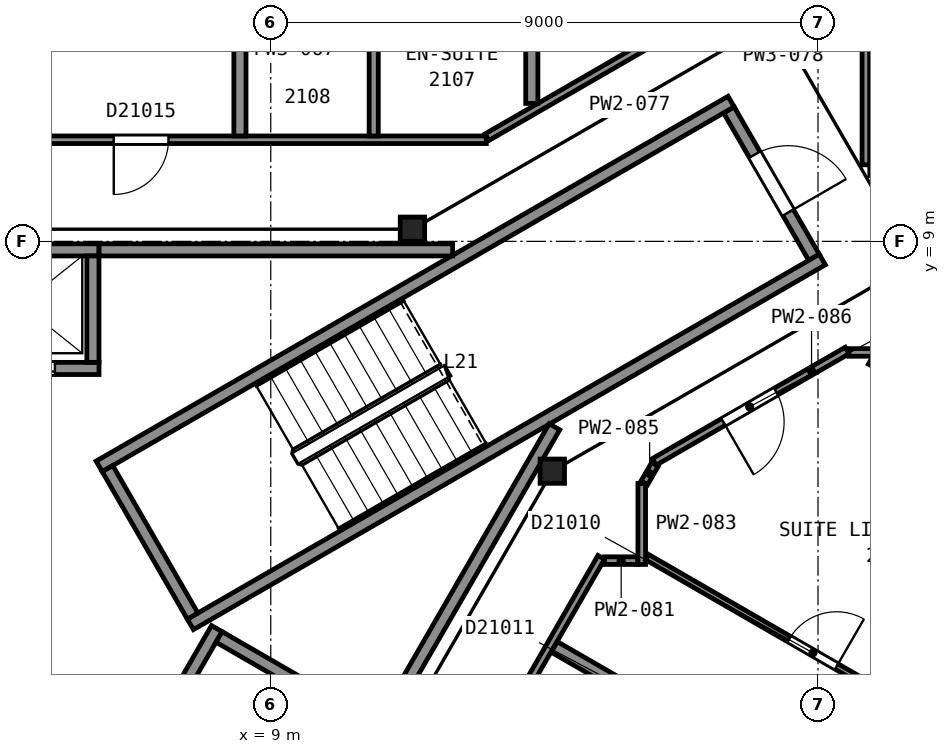
"""IFC4 building model, lengths in metres.
Left out: names, types, materials, properties, quantities, classifications, styles, units other than length and angle.
Written with IfcOpenShell. Run it as: python <this file> out.ifc"""

import sys

from ifc_helpers import new_model, si_unit, direction, frame, frame_2d, origin, origin_2d, place, context, subcontext, project, spatial, rectangle, i_section, extrude, element, fill, save


model = new_model("IFC4")
c1 = context("Model", 3, precision=1e-05, world=origin(), true_north=direction((0.0, 1.0)))
c2 = subcontext(c1, "Body", "Model", "MODEL_VIEW")
j1 = project(units=[si_unit("LENGTHUNIT", "METRE"), si_unit("PLANEANGLEUNIT", "RADIAN")], contexts=[c1])
p1 = place(None, origin())
s1 = spatial("IfcSite", under=j1, at=p1, CompositionType="ELEMENT")
p2 = place(p1, origin())
s2 = spatial("IfcBuilding", under=s1, at=p2, CompositionType="ELEMENT")
p3 = place(p2, frame((0.0, 0.0, 92.8)))
s3 = spatial("IfcBuildingStorey", under=s2, at=p3, CompositionType="ELEMENT", Elevation=92.8)
for number, where, z_axis, x_axis in (
    (1, (13.63, 5.22, 0.0), (0.0, 0.0, 1.0), (1.0, 0.0, 0.0)),
    (2, (11.33, 9.2, 0.0), (0.0, 0.0, 1.0), (1.0, 0.0, 0.0)),
):
    element("IfcColumn", number, at=place(p3, frame(where, z_axis=z_axis, x_axis=x_axis)), inside=s3, PredefinedType="COLUMN", context=c2, shape_type="SweptSolid", body=[
        extrude(i_section(OverallWidth=0.401, OverallDepth=0.399, WebThickness=0.025, FlangeThickness=0.04, FilletRadius=0.015, at=origin_2d()), origin(), (0.0, 0.0, 1.0), 3.6),
    ])
p4 = place(p3, frame((17.934, 8.738, 0.0), z_axis=(0.0, 0.0, 1.0), x_axis=(-0.49998411664, 0.866034573852, 0.0)))
e3 = element("IfcWall", 3, at=p4, inside=s3, PredefinedType="PARTITIONING", context=c2, shape_type="SweptSolid", body=[
    extrude(rectangle(XDim=2.8, YDim=0.2, at=frame_2d((1.4, 0.0))), origin(), (0.0, 0.0, 1.0), 3.35),
])
p5 = place(p4, frame((0.85, 0.0, 0.0)))
e4 = element("IfcOpeningElement", 4, at=p5, cuts=e3, PredefinedType="OPENING", context=c2, shape_type="SweptSolid", body=[
    extrude(rectangle(XDim=1.1, YDim=2.1, at=frame_2d((0.55, 1.05))), frame((0.0, 0.11, 0.0), z_axis=(0.0, -1.0, 0.0), x_axis=(1.0, 0.0, 0.0)), (0.0, 0.0, 1.0), 0.22),
])
for number, where, z_axis, x_axis in (
    (5, (6.178, 5.299, 0.0), (0.0, 0.0, 1.0), (0.866, 0.5, 0.0)),
    (6, (7.678, 2.701, 0.0), (0.0, 0.0, 1.0), (0.866, 0.5, 0.0)),
):
    element("IfcWall", number, at=place(p3, frame(where, z_axis=z_axis, x_axis=x_axis)), inside=s3, PredefinedType="PARTITIONING", context=c2, shape_type="SweptSolid", body=[
        extrude(rectangle(XDim=12.0, YDim=0.2, at=frame_2d((6.0, 0.0))), origin(), (0.0, 0.0, 1.0), 3.35),
    ])
p6 = place(p3, frame((7.715, 2.838, 0.0), z_axis=(0.0, 0.0, 1.0), x_axis=(-0.500049511043, 0.865996816683, 0.0)))
e7 = element("IfcWall", 7, at=p6, inside=s3, PredefinedType="PARTITIONING", context=c2, shape_type="SweptSolid", body=[
    extrude(rectangle(XDim=2.8, YDim=0.2, at=frame_2d((1.4, 0.0))), origin(), (0.0, 0.0, 1.0), 3.35),
])
p7 = place(p3, frame((3.625, 6.91, 0.0), z_axis=(0.0, 0.0, 1.0), x_axis=(1.0, 0.0, 0.0)))
e8 = element("IfcWall", 8, at=p7, inside=s3, PredefinedType="PARTITIONING", context=c2, shape_type="SweptSolid", body=[
    extrude(rectangle(XDim=2.55, YDim=0.2, at=frame_2d((1.275, 0.0))), origin(), (0.0, 0.0, 1.0), 3.6),
])
p8 = place(p7, frame((0.725, 0.0, 0.0)))
e9 = element("IfcOpeningElement", 9, at=p8, cuts=e8, PredefinedType="OPENING", context=c2, shape_type="SweptSolid", body=[
    extrude(rectangle(XDim=1.1, YDim=2.1, at=frame_2d((0.55, 1.05))), frame((0.0, 0.11, 0.0), z_axis=(0.0, -1.0, 0.0), x_axis=(1.0, 0.0, 0.0)), (0.0, 0.0, 1.0), 0.22),
])
p9 = place(p3, frame((3.625, 8.86, 0.0), z_axis=(0.0, 0.0, 1.0), x_axis=(1.0, 0.0, 0.0)))
e10 = element("IfcWall", 10, at=p9, inside=s3, PredefinedType="PARTITIONING", context=c2, shape_type="SweptSolid", body=[
    extrude(rectangle(XDim=2.55, YDim=0.2, at=frame_2d((1.275, 0.0))), origin(), (0.0, 0.0, 1.0), 3.6),
])
p10 = place(p3, frame((5.663, -1.612, 0.0), z_axis=(0.0, 0.0, 1.0), x_axis=(0.49998122708, 0.866036242063, 0.0)))
e11 = element("IfcWall", 11, at=p10, inside=s3, PredefinedType="PARTITIONING", context=c2, shape_type="SweptSolid", body=[
    extrude(rectangle(XDim=4.9, YDim=0.2, at=frame_2d((2.45, 0.0))), origin(), (0.0, 0.0, 1.0), 3.6),
])
p11 = place(p3, frame((6.075, 7.01, 0.0), z_axis=(0.0, 0.0, 1.0), x_axis=(0.0, 1.0, 0.0)))
e12 = element("IfcWall", 12, at=p11, inside=s3, PredefinedType="PARTITIONING", context=c2, shape_type="SweptSolid", body=[
    extrude(rectangle(XDim=1.75, YDim=0.2, at=frame_2d((0.875, 0.0))), origin(), (0.0, 0.0, 1.0), 3.6),
])
p12 = place(p3, frame((9.665, 1.62, 0.0), z_axis=(0.0, 0.0, 1.0), x_axis=(-0.866002029911, 0.500040482552, 0.0)))
e13 = element("IfcWall", 13, at=p12, inside=s3, PredefinedType="PARTITIONING", context=c2, shape_type="SweptSolid", body=[
    extrude(rectangle(XDim=1.75, YDim=0.2, at=frame_2d((0.875, 0.0))), origin(), (0.0, 0.0, 1.0), 3.6),
])
p13 = place(p3, frame((6.177, 8.86, 0.0), z_axis=(0.0, 0.0, 1.0), x_axis=(1.0, 0.0, 0.0)))
e14 = element("IfcWall", 14, at=p13, inside=s3, PredefinedType="PARTITIONING", context=c2, shape_type="SweptSolid", body=[
    extrude(rectangle(XDim=5.814, YDim=0.2, at=frame_2d((2.907, 0.0))), origin(), (0.0, 0.0, 1.0), 3.35),
])
p14 = place(p3, frame((8.492, -3.012, 0.0), z_axis=(0.0, 0.0, 1.0), x_axis=(0.499972957231, 0.866041016371, 0.0)))
e15 = element("IfcWall", 15, at=p14, inside=s3, PredefinedType="PARTITIONING", context=c2, shape_type="SweptSolid", body=[
    extrude(rectangle(XDim=10.349, YDim=0.2, at=frame_2d((5.174, 0.0))), origin(), (0.0, 0.0, 1.0), 3.35),
])
p15 = place(p3, frame((-12.544, 10.671, 0.0), z_axis=(0.0, 0.0, 1.0), x_axis=(1.0, 0.0, 0.0)))
e16 = element("IfcWall", 16, at=p15, inside=s3, PredefinedType="PARTITIONING", context=c2, shape_type="SweptSolid", body=[
    extrude(rectangle(XDim=25.089, YDim=0.125, at=frame_2d((12.544, 0.0))), origin(), (0.0, 0.0, 1.0), 2.613),
])
p16 = place(p15, frame((18.962, 0.0, 0.0)))
e17 = element("IfcOpeningElement", 17, at=p16, cuts=e16, PredefinedType="OPENING", context=c2, shape_type="SweptSolid", body=[
    extrude(rectangle(XDim=0.9, YDim=2.1, at=frame_2d((0.45, 1.05))), frame((0.0, 0.073, 0.0), z_axis=(0.0, -1.0, 0.0), x_axis=(1.0, 0.0, 0.0)), (0.0, 0.0, 1.0), 0.145),
])
p17 = place(p15, frame((14.857, 0.0, 0.0)))
e18 = element("IfcOpeningElement", 18, at=p17, cuts=e16, PredefinedType="OPENING", context=c2, shape_type="SweptSolid", body=[
    extrude(rectangle(XDim=1.0, YDim=2.1, at=frame_2d((0.5, 1.05))), frame((0.0, 0.073, 0.0), z_axis=(0.0, -1.0, 0.0), x_axis=(1.0, 0.0, 0.0)), (0.0, 0.0, 1.0), 0.145),
])
p18 = place(p3, frame((8.493, 10.733, 0.0), z_axis=(0.0, 0.0, 1.0), x_axis=(0.0, 1.0, 0.0)))
e19 = element("IfcWall", 19, at=p18, inside=s3, PredefinedType="PARTITIONING", context=c2, shape_type="SweptSolid", body=[
    extrude(rectangle(XDim=2.838, YDim=0.2, at=frame_2d((1.419, 0.0))), origin(), (0.0, 0.0, 1.0), 2.613),
])
p19 = place(p3, frame((9.41, -4.902, 0.0), z_axis=(0.0, 0.0, 1.0), x_axis=(0.499971244726, 0.866042005013, 0.0)))
e20 = element("IfcWall", 20, at=p19, inside=s3, PredefinedType="PARTITIONING", context=c2, shape_type="SweptSolid", body=[
    extrude(rectangle(XDim=10.052, YDim=0.125, at=frame_2d((5.026, 0.0))), origin(), (0.0, 0.0, 1.0), 2.613),
])
p20 = place(p3, frame((10.693, 10.733, 0.0), z_axis=(0.0, 0.0, 1.0), x_axis=(0.0, 1.0, 0.0)))
e21 = element("IfcWall", 21, at=p20, inside=s3, PredefinedType="PARTITIONING", context=c2, shape_type="SweptSolid", body=[
    extrude(rectangle(XDim=6.982, YDim=0.15, at=frame_2d((3.491, 0.0))), origin(), (0.0, 0.0, 1.0), 2.613),
])
p21 = place(p3, frame((12.556, 10.713, 0.0), z_axis=(0.0, 0.0, 1.0), x_axis=(0.86603035395, 0.499991425964, 0.0)))
e22 = element("IfcWall", 22, at=p21, inside=s3, PredefinedType="PARTITIONING", context=c2, shape_type="SweptSolid", body=[
    extrude(rectangle(XDim=3.824, YDim=0.125, at=frame_2d((1.912, 0.0))), origin(), (0.0, 0.0, 1.0), 2.613),
])
p22 = place(p3, frame((13.293, 11.269, 0.0), z_axis=(0.0, 0.0, 1.0), x_axis=(0.0, 1.0, 0.0)))
e23 = element("IfcWall", 23, at=p22, inside=s3, PredefinedType="PARTITIONING", context=c2, shape_type="SweptSolid", body=[
    extrude(rectangle(XDim=3.665, YDim=0.2, at=frame_2d((1.833, 0.0))), origin(), (0.0, 0.0, 1.0), 2.613),
])
p23 = place(p22, frame((1.32, 0.0, 0.0)))
e24 = element("IfcOpeningElement", 24, at=p23, cuts=e23, PredefinedType="OPENING", context=c2, shape_type="SweptSolid", body=[
    extrude(rectangle(XDim=0.8, YDim=2.1, at=frame_2d((0.4, 1.05))), frame((0.0, 0.11, 0.0), z_axis=(0.0, -1.0, 0.0), x_axis=(1.0, 0.0, 0.0)), (0.0, 0.0, 1.0), 0.22),
])
p24 = place(p3, frame((16.463, 0.714, 0.0), z_axis=(0.0, 0.0, 1.0), x_axis=(-0.86609757561, 0.499874973892, 0.0)))
e25 = element("IfcWall", 25, at=p24, inside=s3, PredefinedType="PARTITIONING", context=c2, shape_type="SweptSolid", body=[
    extrude(rectangle(XDim=3.233, YDim=0.2, at=frame_2d((1.617, 0.0))), origin(), (0.0, 0.0, 1.0), 2.613),
])
p25 = place(p24, frame((1.301, 0.0, 0.0)))
e26 = element("IfcOpeningElement", 26, at=p25, cuts=e25, PredefinedType="OPENING", context=c2, shape_type="SweptSolid", body=[
    extrude(rectangle(XDim=0.8, YDim=2.1, at=frame_2d((0.4, 1.05))), frame((0.0, 0.11, 0.0), z_axis=(0.0, -1.0, 0.0), x_axis=(1.0, 0.0, 0.0)), (0.0, 0.0, 1.0), 0.22),
])
p26 = place(p3, frame((14.489, 3.749, 0.0), z_axis=(0.0, 0.0, 1.0), x_axis=(1.0, 0.0, 0.0)))
e27 = element("IfcWall", 27, at=p26, inside=s3, PredefinedType="PARTITIONING", context=c2, shape_type="SweptSolid", body=[
    extrude(rectangle(XDim=0.547, YDim=0.125, at=frame_2d((0.273, 0.0))), origin(), (0.0, 0.0, 1.0), 2.613),
])
p27 = place(p3, frame((15.101, 3.687, 0.0), z_axis=(0.0, 0.0, 1.0), x_axis=(0.0, 1.0, 0.0)))
e28 = element("IfcWall", 28, at=p27, inside=s3, PredefinedType="PARTITIONING", context=c2, shape_type="SweptSolid", body=[
    extrude(rectangle(XDim=1.331, YDim=0.125, at=frame_2d((0.666, 0.0))), origin(), (0.0, 0.0, 1.0), 2.613),
])
p28 = place(p3, frame((20.787, 0.575, 0.0), z_axis=(0.0, 0.0, 1.0), x_axis=(-0.866012632051, 0.500022120638, 0.0)))
e29 = element("IfcWall", 29, at=p28, inside=s3, PredefinedType="PARTITIONING", context=c2, shape_type="SweptSolid", body=[
    extrude(rectangle(XDim=6.465, YDim=0.1, at=frame_2d((3.232, 0.0))), origin(), (0.0, 0.0, 1.0), 2.613),
])
p29 = place(p28, frame((2.866, 0.0, 0.0)))
e30 = element("IfcOpeningElement", 30, at=p29, cuts=e29, PredefinedType="OPENING", context=c2, shape_type="SweptSolid", body=[
    extrude(rectangle(XDim=0.9, YDim=2.1, at=frame_2d((0.45, 1.05))), frame((0.0, 0.06, 0.0), z_axis=(0.0, -1.0, 0.0), x_axis=(1.0, 0.0, 0.0)), (0.0, 0.0, 1.0), 0.12),
])
p30 = place(p3, frame((15.144, 5.029, 0.0), z_axis=(0.0, 0.0, 1.0), x_axis=(0.499682006278, 0.86620891972, 0.0)))
e31 = element("IfcWall", 31, at=p30, inside=s3, PredefinedType="PARTITIONING", context=c2, shape_type="SweptSolid", body=[
    extrude(rectangle(XDim=0.348, YDim=0.125, at=frame_2d((0.174, 0.0))), origin(), (0.0, 0.0, 1.0), 2.613),
])
p31 = place(p3, frame((18.478, 7.204, 0.0), z_axis=(0.0, 0.0, 1.0), x_axis=(-0.866011320536, -0.500024392108, 0.0)))
e32 = element("IfcWall", 32, at=p31, inside=s3, PredefinedType="PARTITIONING", context=c2, shape_type="SweptSolid", body=[
    extrude(rectangle(XDim=3.663, YDim=0.125, at=frame_2d((1.832, 0.0))), origin(), (0.0, 0.0, 1.0), 2.613),
])
p32 = place(p31, frame((1.351, 0.0, 0.0)))
e33 = element("IfcOpeningElement", 33, at=p32, cuts=e32, PredefinedType="OPENING", context=c2, shape_type="SweptSolid", body=[
    extrude(rectangle(XDim=1.0, YDim=2.1, at=frame_2d((0.5, 1.05))), frame((0.0, 0.073, 0.0), z_axis=(0.0, -1.0, 0.0), x_axis=(1.0, 0.0, 0.0)), (0.0, 0.0, 1.0), 0.145),
])
p33 = place(p3, frame((18.509, 7.173, 0.0), z_axis=(0.0, 0.0, 1.0), x_axis=(1.0, 0.0, 0.0)))
e34 = element("IfcWall", 34, at=p33, inside=s3, PredefinedType="PARTITIONING", context=c2, shape_type="SweptSolid", body=[
    extrude(rectangle(XDim=2.513, YDim=0.125, at=frame_2d((1.256, 0.0))), origin(), (0.0, 0.0, 1.0), 2.613),
])
p34 = place(p3, frame((18.866, 7.046, 0.0), z_axis=(0.0, 0.0, 1.0), x_axis=(0.866042025588, -0.499971209087, 0.0)))
e35 = element("IfcWall", 35, at=p34, inside=s3, PredefinedType="PARTITIONING", context=c2, shape_type="SweptSolid", body=[
    extrude(rectangle(XDim=4.899, YDim=0.15, at=frame_2d((2.45, 0.0))), origin(), (0.0, 0.0, 1.0), 2.613),
])
p35 = place(p3, frame((18.787, 10.259, 0.0), z_axis=(0.0, 0.0, 1.0), x_axis=(0.0, 1.0, 0.0)))
e36 = element("IfcWall", 36, at=p35, inside=s3, PredefinedType="PARTITIONING", context=c2, shape_type="SweptSolid", body=[
    extrude(rectangle(XDim=3.93, YDim=0.125, at=frame_2d((1.965, 0.0))), origin(), (0.0, 0.0, 1.0), 2.613),
])
p36 = place(p5, origin())
e37 = element("IfcDoor", 37, at=p36, inside=s3, OperationType="SINGLE_SWING_LEFT", PredefinedType="DOOR", context=c2, shape_type="SweptSolid", body=[
    extrude(rectangle(XDim=1.1, YDim=2.1, at=frame_2d((0.55, 1.05))), frame((0.0, 0.025, 0.0), z_axis=(0.0, -1.0, 0.0), x_axis=(1.0, 0.0, 0.0)), (0.0, 0.0, 1.0), 0.05),
])
fill(e4, e37)
p37 = place(p8, origin())
e38 = element("IfcDoor", 38, at=p37, inside=s3, OperationType="SLIDING_TO_LEFT", PredefinedType="DOOR", context=c2, shape_type="SweptSolid", body=[
    extrude(rectangle(XDim=1.1, YDim=2.1, at=frame_2d((0.55, 1.05))), frame((0.0, 0.025, 0.0), z_axis=(0.0, -1.0, 0.0), x_axis=(1.0, 0.0, 0.0)), (0.0, 0.0, 1.0), 0.05),
])
fill(e9, e38)
p38 = place(p16, origin())
e39 = element("IfcDoor", 39, at=p38, inside=s3, OperationType="SINGLE_SWING_LEFT", PredefinedType="DOOR", context=c2, shape_type="SweptSolid", body=[
    extrude(rectangle(XDim=0.9, YDim=2.1, at=frame_2d((0.45, 1.05))), frame((0.0, 0.025, 0.0), z_axis=(0.0, -1.0, 0.0), x_axis=(1.0, 0.0, 0.0)), (0.0, 0.0, 1.0), 0.05),
])
fill(e17, e39)
p39 = place(p29, origin())
e40 = element("IfcDoor", 40, at=p39, inside=s3, OperationType="SINGLE_SWING_LEFT", PredefinedType="DOOR", context=c2, shape_type="SweptSolid", body=[
    extrude(rectangle(XDim=0.9, YDim=2.1, at=frame_2d((0.45, 1.05))), frame((0.0, 0.025, 0.0), z_axis=(0.0, -1.0, 0.0), x_axis=(1.0, 0.0, 0.0)), (0.0, 0.0, 1.0), 0.05),
])
fill(e30, e40)
p40 = place(p32, origin())
e41 = element("IfcDoor", 41, at=p40, inside=s3, OperationType="SINGLE_SWING_RIGHT", PredefinedType="DOOR", context=c2, shape_type="SweptSolid", body=[
    extrude(rectangle(XDim=1.0, YDim=2.1, at=frame_2d((0.5, 1.05))), frame((0.0, 0.025, 0.0), z_axis=(0.0, -1.0, 0.0), x_axis=(1.0, 0.0, 0.0)), (0.0, 0.0, 1.0), 0.05),
])
fill(e33, e41)
save(model, sys.argv[1])
